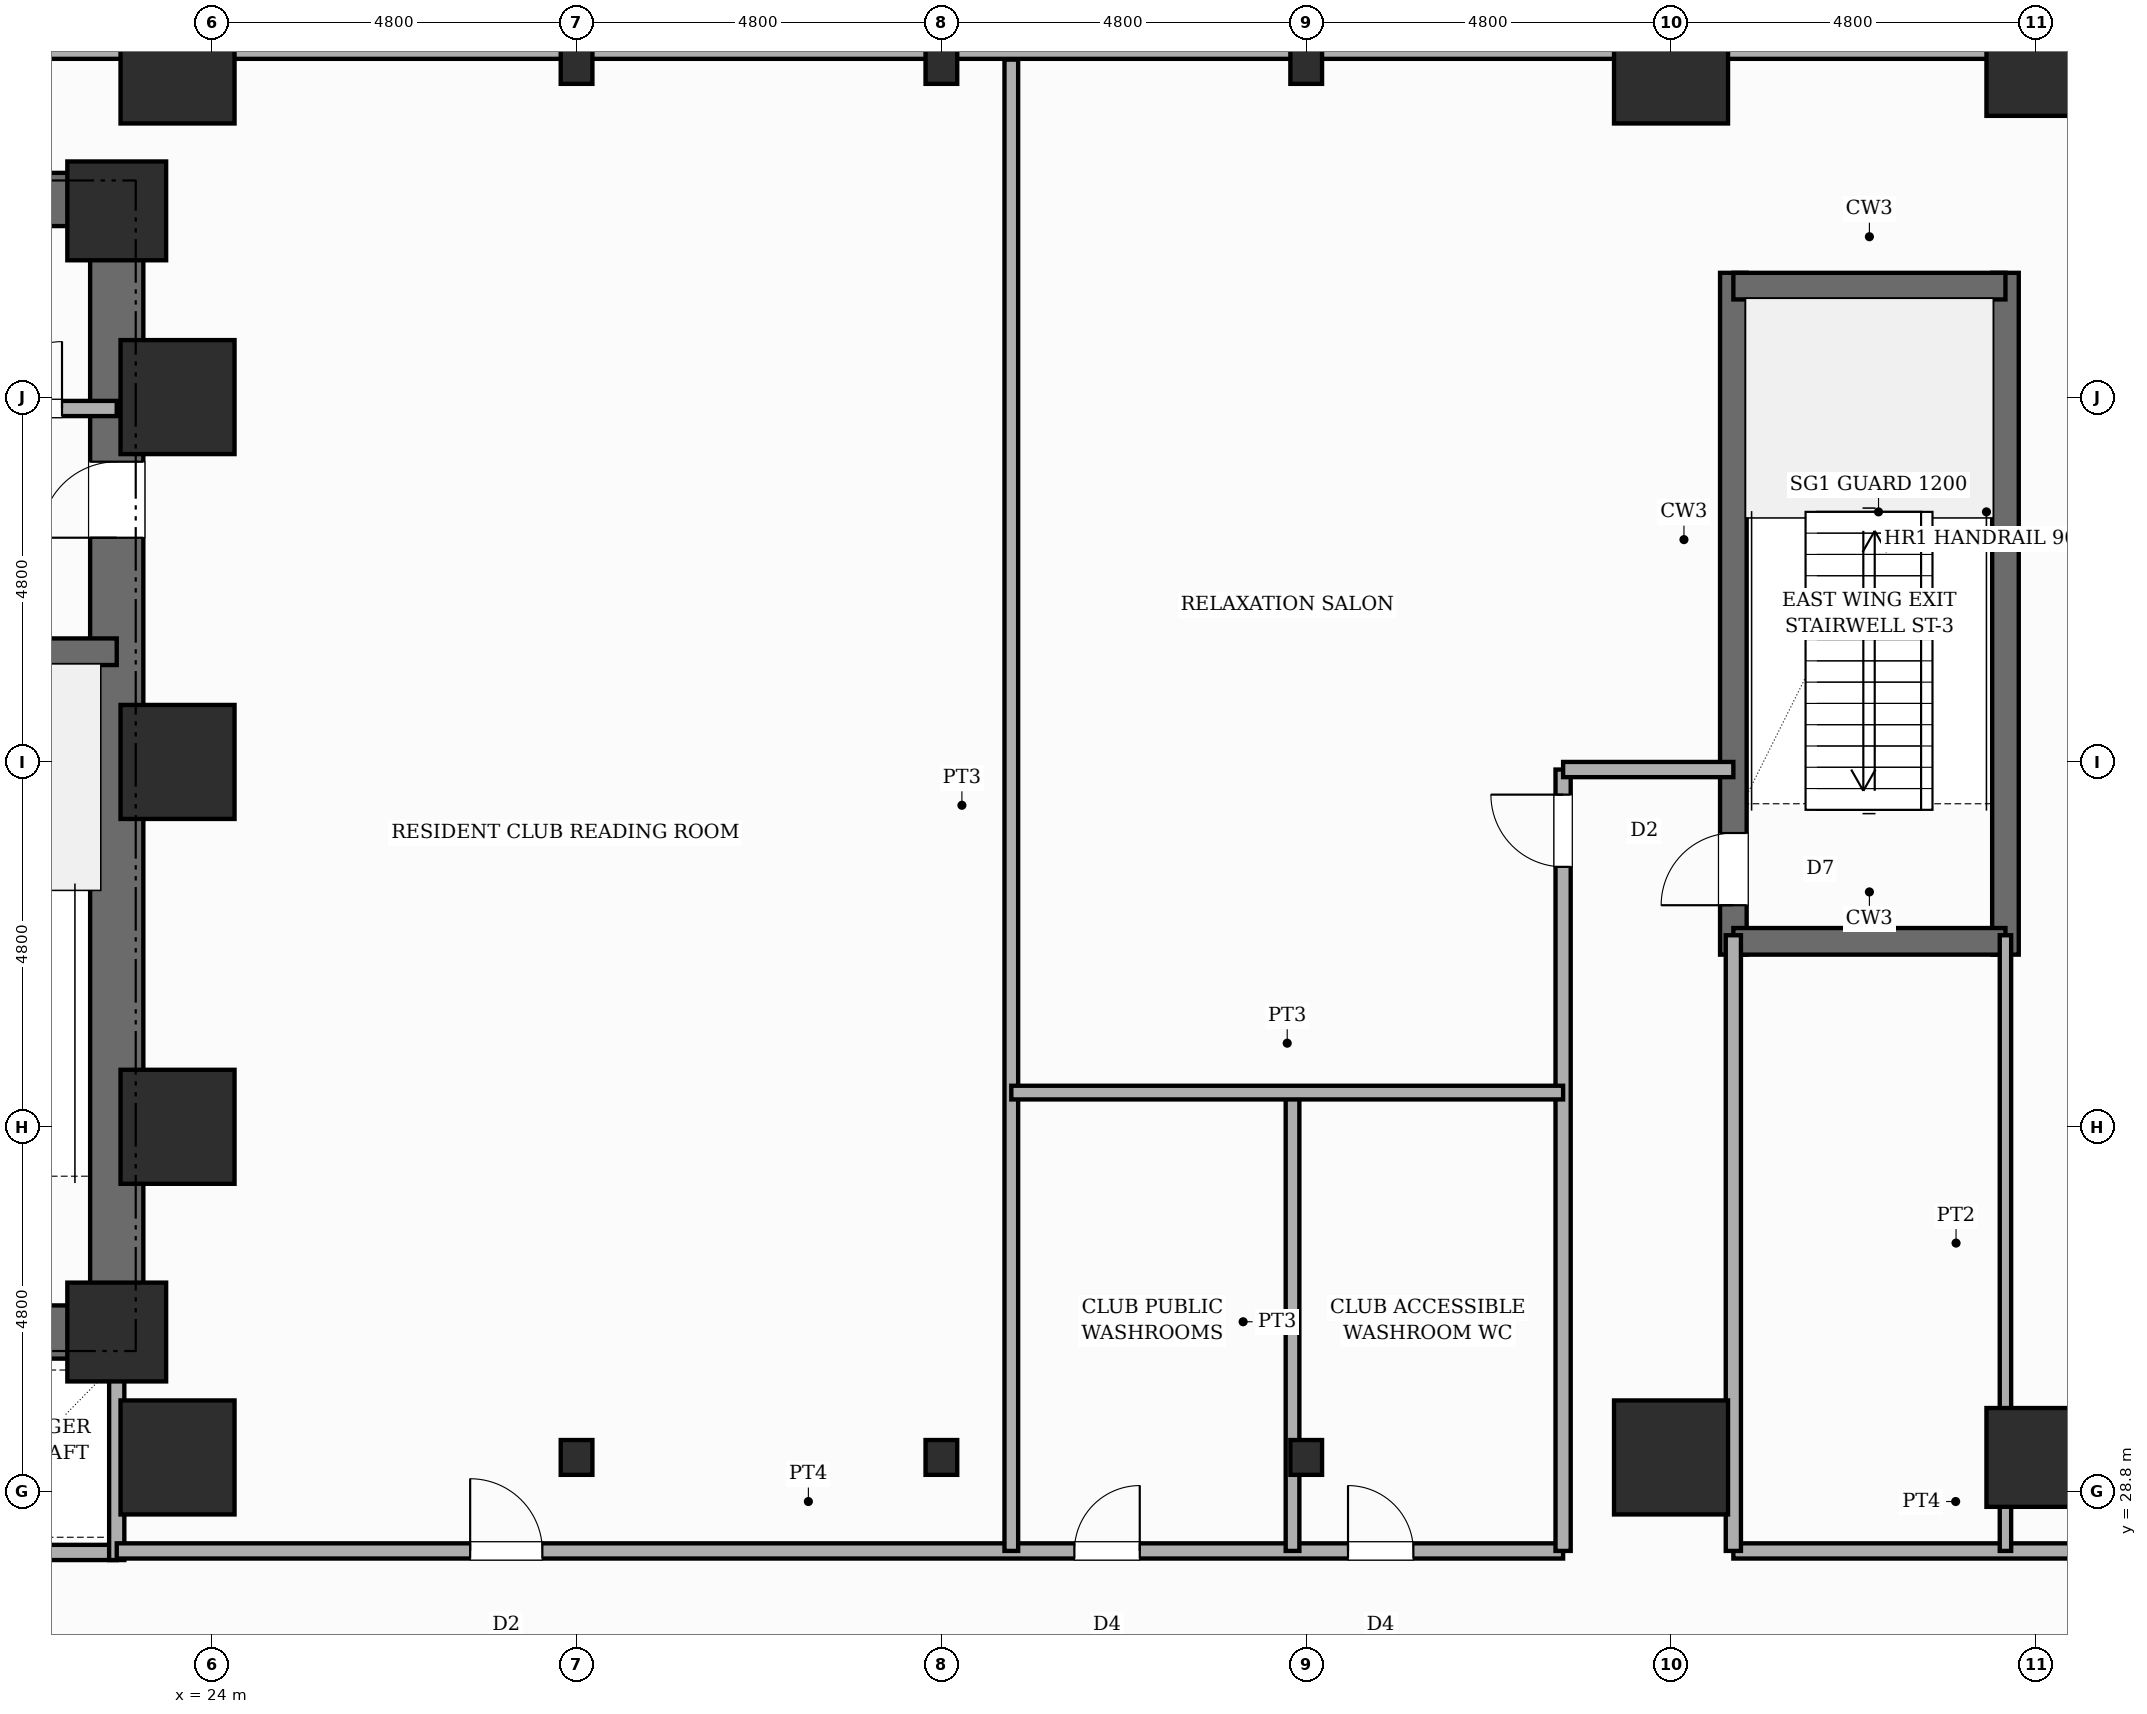
"""IFC4 building model, lengths in metres.
Left out: names, types, materials, properties, quantities, classifications, styles, units other than length and angle.
Written with IfcOpenShell. Run it as: python <this file> out.ifc"""

import sys

from ifc_helpers import new_model, si_unit, direction, frame, frame_2d, origin, origin_2d, place, context, subcontext, project, spatial, rectangle, i_section, extrude, element, fill, save


model = new_model("IFC4")
c1 = context("Model", 3, precision=1e-05, world=origin(), true_north=direction((0.0, 1.0)))
c2 = subcontext(c1, "Body", "Model", "MODEL_VIEW")
j1 = project(units=[si_unit("LENGTHUNIT", "METRE"), si_unit("PLANEANGLEUNIT", "RADIAN")], contexts=[c1])
p1 = place(None, origin())
s1 = spatial("IfcSite", under=j1, at=p1, CompositionType="ELEMENT")
p2 = place(p1, origin())
s2 = spatial("IfcBuilding", under=s1, at=p2, CompositionType="ELEMENT")
p3 = place(p2, frame((0.0, 0.0, 19.6)))
s3 = spatial("IfcBuildingStorey", under=s2, at=p3, CompositionType="ELEMENT", Elevation=19.6)
p4 = place(p3, frame((22.75, 30.55, 0.0), z_axis=(0.0, 0.0, 1.0), x_axis=(0.0, 1.0, 0.0)))
e1 = element("IfcWall", 1, at=p4, inside=s3, PredefinedType="SHEAR", context=c2, shape_type="SweptSolid", body=[
    extrude(rectangle(XDim=15.6, YDim=0.7, at=frame_2d((7.8, 0.0))), origin(), (0.0, 0.0, 1.0), 5.4),
])
p5 = place(p4, frame((10.8, 0.0, 0.0)))
e2 = element("IfcOpeningElement", 2, at=p5, cuts=e1, PredefinedType="OPENING", context=c2, shape_type="SweptSolid", body=[
    extrude(rectangle(XDim=1.0, YDim=2.15, at=frame_2d((0.5, 1.075))), frame((0.0, 0.36, 0.0), z_axis=(0.0, -1.0, 0.0), x_axis=(1.0, 0.0, 0.0)), (0.0, 0.0, 1.0), 0.72),
])
p6 = place(p3, frame((6.05, 45.8, 0.0), z_axis=(0.0, 0.0, 1.0), x_axis=(1.0, 0.0, 0.0)))
e3 = element("IfcWall", 3, at=p6, inside=s3, PredefinedType="SHEAR", context=c2, shape_type="SweptSolid", body=[
    extrude(rectangle(XDim=16.7, YDim=0.7, at=frame_2d((8.35, 0.0))), origin(), (0.0, 0.0, 1.0), 5.4),
])
p7 = place(p3, frame((18.84, 30.9, 0.0), z_axis=(0.0, 0.0, 1.0), x_axis=(1.0, 0.0, 0.0)))
e4 = element("IfcWall", 4, at=p7, inside=s3, PredefinedType="SHEAR", context=c2, shape_type="SweptSolid", body=[
    extrude(rectangle(XDim=3.91, YDim=0.7, at=frame_2d((1.955, 0.0))), origin(), (0.0, 0.0, 1.0), 5.4),
])
p8 = place(p3, frame((18.84, 39.85, 0.0), z_axis=(0.0, 0.0, 1.0), x_axis=(1.0, 0.0, 0.0)))
e5 = element("IfcWall", 5, at=p8, inside=s3, PredefinedType="SHEAR", context=c2, shape_type="SweptSolid", body=[
    extrude(rectangle(XDim=3.91, YDim=0.35, at=frame_2d((1.955, 0.0))), origin(), (0.0, 0.0, 1.0), 5.4),
])
p9 = place(p3, frame((44.02, 35.865, 0.0), z_axis=(0.0, 0.0, 1.0), x_axis=(0.0, 1.0, 0.0)))
e6 = element("IfcWall", 6, at=p9, inside=s3, PredefinedType="SHEAR", context=c2, shape_type="SweptSolid", body=[
    extrude(rectangle(XDim=8.97, YDim=0.35, at=frame_2d((4.485, 0.0))), origin(), (0.0, 0.0, 1.0), 5.4),
])
p10 = place(p9, frame((0.65, 0.0, 0.0)))
e7 = element("IfcOpeningElement", 7, at=p10, cuts=e6, PredefinedType="OPENING", context=c2, shape_type="SweptSolid", body=[
    extrude(rectangle(XDim=0.95, YDim=2.1, at=frame_2d((0.475, 1.05))), frame((0.0, 0.185, 0.0), z_axis=(0.0, -1.0, 0.0), x_axis=(1.0, 0.0, 0.0)), (0.0, 0.0, 1.0), 0.37),
])
p11 = place(p3, frame((47.6, 35.865, 0.0), z_axis=(0.0, 0.0, 1.0), x_axis=(0.0, 1.0, 0.0)))
e8 = element("IfcWall", 8, at=p11, inside=s3, PredefinedType="SHEAR", context=c2, shape_type="SweptSolid", body=[
    extrude(rectangle(XDim=8.97, YDim=0.35, at=frame_2d((4.485, 0.0))), origin(), (0.0, 0.0, 1.0), 5.4),
])
for number, where, z_axis, x_axis in (
    (9, (44.02, 36.04, 0.0), (0.0, 0.0, 1.0), (1.0, 0.0, 0.0)),
    (10, (44.02, 44.66, 0.0), (0.0, 0.0, 1.0), (1.0, 0.0, 0.0)),
):
    element("IfcWall", number, at=place(p3, frame(where, z_axis=z_axis, x_axis=x_axis)), inside=s3, PredefinedType="SHEAR", context=c2, shape_type="SweptSolid", body=[
        extrude(rectangle(XDim=3.58, YDim=0.35, at=frame_2d((1.79, 0.0))), origin(), (0.0, 0.0, 1.0), 5.4),
    ])
for number, where, z_axis, x_axis in (
    (11, (22.75, 30.9, 0.0), (0.0, 0.0, 1.0), (1.0, 0.0, 0.0)),
    (12, (22.75, 45.65, 0.0), (0.0, 0.0, 1.0), (1.0, 0.0, 0.0)),
):
    element("IfcColumn", number, at=place(p3, frame(where, z_axis=z_axis, x_axis=x_axis)), inside=s3, PredefinedType="COLUMN", context=c2, shape_type="SweptSolid", body=[
        extrude(rectangle(XDim=1.3, YDim=1.3, at=origin_2d()), origin(), (0.0, 0.0, 1.0), 5.4),
    ])
for number, where, z_axis, x_axis in (
    (13, (23.55, 29.25, 0.0), (0.0, 0.0, 1.0), (1.0, 0.0, 0.0)),
    (14, (23.55, 33.6, 0.0), (0.0, 0.0, 1.0), (1.0, 0.0, 0.0)),
    (15, (23.55, 38.4, 0.0), (0.0, 0.0, 1.0), (1.0, 0.0, 0.0)),
    (16, (23.55, 43.2, 0.0), (0.0, 0.0, 1.0), (1.0, 0.0, 0.0)),
    (17, (23.55, 47.55, 0.0), (0.0, 0.0, 1.0), (1.0, 0.0, 0.0)),
):
    element("IfcColumn", number, at=place(p3, frame(where, z_axis=z_axis, x_axis=x_axis)), inside=s3, PredefinedType="USERDEFINED", context=c2, shape_type="SweptSolid", body=[
        extrude(rectangle(XDim=1.5, YDim=1.5, at=origin_2d()), origin(), (0.0, 0.0, 1.0), 5.4),
    ])
for number, where, z_axis, x_axis in (
    (18, (28.8, 29.25, 0.0), (0.0, 0.0, 1.0), (1.0, 0.0, 0.0)),
    (19, (28.8, 47.55, 0.0), (0.0, 0.0, 1.0), (1.0, 0.0, 0.0)),
    (20, (33.6, 29.25, 0.0), (0.0, 0.0, 1.0), (1.0, 0.0, 0.0)),
    (21, (33.6, 47.55, 0.0), (0.0, 0.0, 1.0), (1.0, 0.0, 0.0)),
    (22, (38.4, 29.25, 0.0), (0.0, 0.0, 1.0), (1.0, 0.0, 0.0)),
    (23, (38.4, 47.55, 0.0), (0.0, 0.0, 1.0), (1.0, 0.0, 0.0)),
):
    element("IfcColumn", number, at=place(p3, frame(where, z_axis=z_axis, x_axis=x_axis)), inside=s3, PredefinedType="COLUMN", context=c2, shape_type="SweptSolid", body=[
        extrude(i_section(OverallWidth=0.417, OverallDepth=0.458, WebThickness=0.03, FlangeThickness=0.045, FilletRadius=0.022, at=origin_2d()), origin(), (0.0, 0.0, 1.0), 5.4),
    ])
for number, where, z_axis, x_axis in (
    (24, (43.2, 29.25, 0.0), (0.0, 0.0, 1.0), (1.0, 0.0, 0.0)),
    (25, (43.2, 47.55, 0.0), (0.0, 0.0, 1.0), (1.0, 0.0, 0.0)),
):
    element("IfcColumn", number, at=place(p3, frame(where, z_axis=z_axis, x_axis=x_axis)), inside=s3, PredefinedType="USERDEFINED", context=c2, shape_type="SweptSolid", body=[
        extrude(rectangle(XDim=1.5, YDim=1.5, at=origin_2d()), origin(), (0.0, 0.0, 1.0), 5.4),
    ])
for number, where, z_axis, x_axis in (
    (26, (48.0, 29.25, 0.0), (0.0, 0.0, 1.0), (1.0, 0.0, 0.0)),
    (27, (48.0, 47.55, 0.0), (0.0, 0.0, 1.0), (1.0, 0.0, 0.0)),
):
    element("IfcColumn", number, at=place(p3, frame(where, z_axis=z_axis, x_axis=x_axis)), inside=s3, PredefinedType="COLUMN", context=c2, shape_type="SweptSolid", body=[
        extrude(rectangle(XDim=1.3, YDim=1.3, at=origin_2d()), origin(), (0.0, 0.0, 1.0), 5.4),
    ])
p12 = place(p3, frame((0.0, 47.825, 0.0), z_axis=(0.0, 0.0, 1.0), x_axis=(1.0, 0.0, 0.0)))
e28 = element("IfcWall", 28, at=p12, inside=s3, PredefinedType="STANDARD", context=c2, shape_type="SweptSolid", body=[
    extrude(rectangle(XDim=57.6, YDim=0.35, at=frame_2d((28.8, 0.0))), origin(), (0.0, 0.0, 1.0), 4.23),
])
p13 = place(p3, frame((20.5, 43.05, 0.0), z_axis=(0.0, 0.0, 1.0), x_axis=(1.0, 0.0, 0.0)))
e29 = element("IfcWall", 29, at=p13, inside=s3, PredefinedType="POLYGONAL", context=c2, shape_type="SweptSolid", body=[
    extrude(rectangle(XDim=2.25, YDim=0.2, at=frame_2d((1.125, 0.0))), origin(), (0.0, 0.0, 1.0), 4.23),
])
p14 = place(p13, frame((0.65, 0.0, 0.0)))
e30 = element("IfcOpeningElement", 30, at=p14, cuts=e29, PredefinedType="OPENING", context=c2, shape_type="SweptSolid", body=[
    extrude(rectangle(XDim=0.88, YDim=2.1, at=frame_2d((0.44, 1.05))), frame((0.0, 0.11, 0.0), z_axis=(0.0, -1.0, 0.0), x_axis=(1.0, 0.0, 0.0)), (0.0, 0.0, 1.0), 0.22),
])
p15 = place(p3, frame((15.5, 28.0, 0.0), z_axis=(0.0, 0.0, 1.0), x_axis=(1.0, 0.0, 0.0)))
e31 = element("IfcWall", 31, at=p15, inside=s3, PredefinedType="POLYGONAL", context=c2, shape_type="SweptSolid", body=[
    extrude(rectangle(XDim=7.25, YDim=0.2, at=frame_2d((3.625, 0.0))), origin(), (0.0, 0.0, 1.0), 5.15),
])
p16 = place(p3, frame((22.75, 27.9, 0.0), z_axis=(0.0, 0.0, 1.0), x_axis=(0.0, 1.0, 0.0)))
e32 = element("IfcWall", 32, at=p16, inside=s3, PredefinedType="POLYGONAL", context=c2, shape_type="SweptSolid", body=[
    extrude(rectangle(XDim=3.0, YDim=0.2, at=frame_2d((1.5, 0.0))), origin(), (0.0, 0.0, 1.0), 5.15),
])
p17 = place(p3, frame((22.75, 28.02, 0.0), z_axis=(0.0, 0.0, 1.0), x_axis=(1.0, 0.0, 0.0)))
e33 = element("IfcWall", 33, at=p17, inside=s3, PredefinedType="PARTITIONING", context=c2, shape_type="SweptSolid", body=[
    extrude(rectangle(XDim=19.03, YDim=0.2, at=frame_2d((9.515, 0.0))), origin(), (0.0, 0.0, 1.0), 5.15),
])
p18 = place(p17, frame((4.65, 0.0, 0.0)))
e34 = element("IfcOpeningElement", 34, at=p18, cuts=e33, PredefinedType="OPENING", context=c2, shape_type="SweptSolid", body=[
    extrude(rectangle(XDim=0.95, YDim=2.15, at=frame_2d((0.475, 1.075))), frame((0.0, 0.11, 0.0), z_axis=(0.0, -1.0, 0.0), x_axis=(1.0, 0.0, 0.0)), (0.0, 0.0, 1.0), 0.22),
])
p19 = place(p17, frame((12.6, 0.0, 0.0)))
e35 = element("IfcOpeningElement", 35, at=p19, cuts=e33, PredefinedType="OPENING", context=c2, shape_type="SweptSolid", body=[
    extrude(rectangle(XDim=0.86, YDim=2.1, at=frame_2d((0.43, 1.05))), frame((0.0, 0.11, 0.0), z_axis=(0.0, -1.0, 0.0), x_axis=(1.0, 0.0, 0.0)), (0.0, 0.0, 1.0), 0.22),
])
p20 = place(p17, frame((16.2, 0.0, 0.0)))
e36 = element("IfcOpeningElement", 36, at=p20, cuts=e33, PredefinedType="OPENING", context=c2, shape_type="SweptSolid", body=[
    extrude(rectangle(XDim=0.86, YDim=2.1, at=frame_2d((0.43, 1.05))), frame((0.0, 0.11, 0.0), z_axis=(0.0, -1.0, 0.0), x_axis=(1.0, 0.0, 0.0)), (0.0, 0.0, 1.0), 0.22),
])
p21 = place(p3, frame((44.02, 28.02, 0.0), z_axis=(0.0, 0.0, 1.0), x_axis=(1.0, 0.0, 0.0)))
e37 = element("IfcWall", 37, at=p21, inside=s3, PredefinedType="PARTITIONING", context=c2, shape_type="SweptSolid", body=[
    extrude(rectangle(XDim=13.22, YDim=0.2, at=frame_2d((6.61, 0.0))), origin(), (0.0, 0.0, 1.0), 5.15),
])
p22 = place(p21, frame((6.2, 0.0, 0.0)))
e38 = element("IfcOpeningElement", 38, at=p22, cuts=e37, PredefinedType="OPENING", context=c2, shape_type="SweptSolid", body=[
    extrude(rectangle(XDim=0.95, YDim=2.15, at=frame_2d((0.475, 1.075))), frame((0.0, 0.11, 0.0), z_axis=(0.0, -1.0, 0.0), x_axis=(1.0, 0.0, 0.0)), (0.0, 0.0, 1.0), 0.22),
])
p23 = place(p3, frame((41.78, 28.02, 0.0), z_axis=(0.0, 0.0, 1.0), x_axis=(0.0, 1.0, 0.0)))
e39 = element("IfcWall", 39, at=p23, inside=s3, PredefinedType="PARTITIONING", context=c2, shape_type="SweptSolid", body=[
    extrude(rectangle(XDim=10.28, YDim=0.2, at=frame_2d((5.14, 0.0))), origin(), (0.0, 0.0, 1.0), 5.15),
])
p24 = place(p23, frame((9.0, 0.0, 0.0)))
e40 = element("IfcOpeningElement", 40, at=p24, cuts=e39, PredefinedType="OPENING", context=c2, shape_type="SweptSolid", body=[
    extrude(rectangle(XDim=0.95, YDim=2.15, at=frame_2d((0.475, 1.075))), frame((0.0, 0.11, 0.0), z_axis=(0.0, -1.0, 0.0), x_axis=(1.0, 0.0, 0.0)), (0.0, 0.0, 1.0), 0.22),
])
p25 = place(p3, frame((44.02, 28.02, 0.0), z_axis=(0.0, 0.0, 1.0), x_axis=(0.0, 1.0, 0.0)))
e41 = element("IfcWall", 41, at=p25, inside=s3, PredefinedType="PARTITIONING", context=c2, shape_type="SweptSolid", body=[
    extrude(rectangle(XDim=8.1, YDim=0.2, at=frame_2d((4.05, 0.0))), origin(), (0.0, 0.0, 1.0), 5.15),
])
p26 = place(p3, frame((41.78, 38.3, 0.0), z_axis=(0.0, 0.0, 1.0), x_axis=(1.0, 0.0, 0.0)))
e42 = element("IfcWall", 42, at=p26, inside=s3, PredefinedType="PARTITIONING", context=c2, shape_type="SweptSolid", body=[
    extrude(rectangle(XDim=2.24, YDim=0.2, at=frame_2d((1.12, 0.0))), origin(), (0.0, 0.0, 1.0), 5.15),
])
p27 = place(p3, frame((47.6, 28.02, 0.0), z_axis=(0.0, 0.0, 1.0), x_axis=(0.0, 1.0, 0.0)))
e43 = element("IfcWall", 43, at=p27, inside=s3, PredefinedType="PARTITIONING", context=c2, shape_type="SweptSolid", body=[
    extrude(rectangle(XDim=8.1, YDim=0.15, at=frame_2d((4.05, 0.0))), origin(), (0.0, 0.0, 1.0), 5.15),
])
p28 = place(p3, frame((34.52, 28.02, 0.0), z_axis=(0.0, 0.0, 1.0), x_axis=(0.0, 1.0, 0.0)))
e44 = element("IfcWall", 44, at=p28, inside=s3, PredefinedType="PLUMBINGWALL", context=c2, shape_type="SweptSolid", body=[
    extrude(rectangle(XDim=19.62, YDim=0.18, at=frame_2d((9.81, 0.0))), origin(), (0.0, 0.0, 1.0), 5.15),
])
p29 = place(p3, frame((38.22, 28.02, 0.0), z_axis=(0.0, 0.0, 1.0), x_axis=(0.0, 1.0, 0.0)))
e45 = element("IfcWall", 45, at=p29, inside=s3, PredefinedType="PLUMBINGWALL", context=c2, shape_type="SweptSolid", body=[
    extrude(rectangle(XDim=6.03, YDim=0.18, at=frame_2d((3.015, 0.0))), origin(), (0.0, 0.0, 1.0), 4.23),
])
p30 = place(p3, frame((34.52, 34.05, 0.0), z_axis=(0.0, 0.0, 1.0), x_axis=(1.0, 0.0, 0.0)))
e46 = element("IfcWall", 46, at=p30, inside=s3, PredefinedType="PLUMBINGWALL", context=c2, shape_type="SweptSolid", body=[
    extrude(rectangle(XDim=7.26, YDim=0.18, at=frame_2d((3.63, 0.0))), origin(), (0.0, 0.0, 1.0), 5.15),
])
p31 = place(p10, origin())
e47 = element("IfcDoor", 47, at=p31, inside=s3, OperationType="SINGLE_SWING_LEFT", PredefinedType="DOOR", context=c2, shape_type="SweptSolid", body=[
    extrude(rectangle(XDim=0.95, YDim=2.1, at=frame_2d((0.475, 1.05))), frame((0.0, 0.025, 0.0), z_axis=(0.0, -1.0, 0.0), x_axis=(1.0, 0.0, 0.0)), (0.0, 0.0, 1.0), 0.05),
])
fill(e7, e47)
p32 = place(p5, origin())
e48 = element("IfcDoor", 48, at=p32, inside=s3, OperationType="SINGLE_SWING_LEFT", PredefinedType="DOOR", context=c2, shape_type="SweptSolid", body=[
    extrude(rectangle(XDim=1.0, YDim=2.15, at=frame_2d((0.5, 1.075))), frame((0.0, 0.025, 0.0), z_axis=(0.0, -1.0, 0.0), x_axis=(1.0, 0.0, 0.0)), (0.0, 0.0, 1.0), 0.05),
])
fill(e2, e48)
p33 = place(p14, origin())
e49 = element("IfcDoor", 49, at=p33, inside=s3, OperationType="SINGLE_SWING_RIGHT", PredefinedType="DOOR", context=c2, shape_type="SweptSolid", body=[
    extrude(rectangle(XDim=0.88, YDim=2.1, at=frame_2d((0.44, 1.05))), frame((0.0, 0.025, 0.0), z_axis=(0.0, -1.0, 0.0), x_axis=(1.0, 0.0, 0.0)), (0.0, 0.0, 1.0), 0.05),
])
fill(e30, e49)
p34 = place(p18, origin())
e50 = element("IfcDoor", 50, at=p34, inside=s3, OperationType="SINGLE_SWING_LEFT", PredefinedType="DOOR", context=c2, shape_type="SweptSolid", body=[
    extrude(rectangle(XDim=0.95, YDim=2.15, at=frame_2d((0.475, 1.075))), frame((0.0, 0.025, 0.0), z_axis=(0.0, -1.0, 0.0), x_axis=(1.0, 0.0, 0.0)), (0.0, 0.0, 1.0), 0.05),
])
fill(e34, e50)
p35 = place(p19, origin())
e51 = element("IfcDoor", 51, at=p35, inside=s3, OperationType="SINGLE_SWING_RIGHT", PredefinedType="DOOR", context=c2, shape_type="SweptSolid", body=[
    extrude(rectangle(XDim=0.86, YDim=2.1, at=frame_2d((0.43, 1.05))), frame((0.0, 0.025, 0.0), z_axis=(0.0, -1.0, 0.0), x_axis=(1.0, 0.0, 0.0)), (0.0, 0.0, 1.0), 0.05),
])
fill(e35, e51)
p36 = place(p20, origin())
e52 = element("IfcDoor", 52, at=p36, inside=s3, OperationType="SINGLE_SWING_LEFT", PredefinedType="DOOR", context=c2, shape_type="SweptSolid", body=[
    extrude(rectangle(XDim=0.86, YDim=2.1, at=frame_2d((0.43, 1.05))), frame((0.0, 0.025, 0.0), z_axis=(0.0, -1.0, 0.0), x_axis=(1.0, 0.0, 0.0)), (0.0, 0.0, 1.0), 0.05),
])
fill(e36, e52)
p37 = place(p24, origin())
e53 = element("IfcDoor", 53, at=p37, inside=s3, OperationType="SINGLE_SWING_RIGHT", PredefinedType="DOOR", context=c2, shape_type="SweptSolid", body=[
    extrude(rectangle(XDim=0.95, YDim=2.15, at=frame_2d((0.475, 1.075))), frame((0.0, 0.025, 0.0), z_axis=(0.0, -1.0, 0.0), x_axis=(1.0, 0.0, 0.0)), (0.0, 0.0, 1.0), 0.05),
])
fill(e40, e53)
save(model, sys.argv[1])
